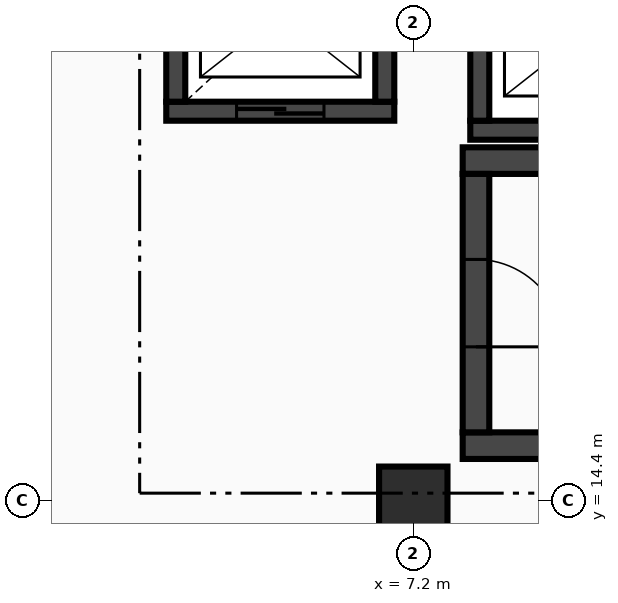
"""IFC4 building model, lengths in metres.
Left out: names, types, materials, properties, quantities, classifications, styles, units other than length and angle.
Written with IfcOpenShell. Run it as: python <this file> out.ifc"""

import sys

from ifc_helpers import new_model, si_unit, direction, frame, frame_2d, origin, origin_2d, place, context, subcontext, project, spatial, rectangle, extrude, element, fill, save


model = new_model("IFC4")
c1 = context("Model", 3, precision=1e-05, world=origin(), true_north=direction((0.0, 1.0)))
c2 = subcontext(c1, "Body", "Model", "MODEL_VIEW")
j1 = project(units=[si_unit("LENGTHUNIT", "METRE"), si_unit("PLANEANGLEUNIT", "RADIAN")], contexts=[c1])
p1 = place(None, origin())
s1 = spatial("IfcSite", under=j1, at=p1, CompositionType="ELEMENT")
p2 = place(p1, origin())
s2 = spatial("IfcBuilding", under=s1, at=p2, CompositionType="ELEMENT")
p3 = place(p2, frame((0.0, 0.0, 5.4)))
s3 = spatial("IfcBuildingStorey", under=s2, at=p3, CompositionType="ELEMENT", Elevation=5.4)
p4 = place(p3, frame((7.2, 14.4, 0.0), z_axis=(0.0, 0.0, 1.0), x_axis=(1.0, 0.0, 0.0)))
e1 = element("IfcColumn", 1, at=p4, inside=s3, PredefinedType="COLUMN", context=c2, shape_type="SweptSolid", body=[
    extrude(rectangle(XDim=0.9, YDim=0.9, at=origin_2d()), origin(), (0.0, 0.0, 1.0), 4.8),
])
for number, where, z_axis, x_axis in (
    (2, (7.85, 15.125, 0.0), (0.0, 0.0, 1.0), (1.0, 0.0, 0.0)),
    (3, (17.15, 18.875, 0.0), (0.0, 0.0, 1.0), (-1.0, 0.0, 0.0)),
):
    element("IfcWall", number, at=place(p3, frame(where, z_axis=z_axis, x_axis=x_axis)), inside=s3, PredefinedType="SHEAR", context=c2, shape_type="SweptSolid", body=[
        extrude(rectangle(XDim=9.3, YDim=0.35, at=frame_2d((4.65, 0.0))), origin(), (0.0, 0.0, 1.0), 4.52),
    ])
p5 = place(p3, frame((8.025, 18.7, 0.0), z_axis=(0.0, 0.0, 1.0), x_axis=(0.0, -1.0, 0.0)))
e4 = element("IfcWall", 4, at=p5, inside=s3, PredefinedType="SHEAR", context=c2, shape_type="SweptSolid", body=[
    extrude(rectangle(XDim=3.4, YDim=0.35, at=frame_2d((1.7, 0.0))), origin(), (0.0, 0.0, 1.0), 4.52),
])
p6 = place(p5, frame((1.125, 0.0, 0.0)))
e5 = element("IfcOpeningElement", 5, at=p6, cuts=e4, PredefinedType="OPENING", context=c2, shape_type="SweptSolid", body=[
    extrude(rectangle(XDim=1.15, YDim=2.1, at=frame_2d((0.575, 1.05))), frame((0.0, 0.185, 0.0), z_axis=(0.0, -1.0, 0.0), x_axis=(1.0, 0.0, 0.0)), (0.0, 0.0, 1.0), 0.37),
])
p7 = place(p3, frame((3.95, 19.525, 0.0), z_axis=(0.0, 0.0, 1.0), x_axis=(1.0, 0.0, 0.0)))
e6 = element("IfcWall", 6, at=p7, inside=s3, PredefinedType="SHEAR", context=c2, shape_type="SweptSolid", body=[
    extrude(rectangle(XDim=3.0, YDim=0.25, at=frame_2d((1.5, 0.0))), origin(), (0.0, 0.0, 1.0), 4.52),
])
p8 = place(p7, frame((0.925, 0.0, 0.0)))
e7 = element("IfcOpeningElement", 7, at=p8, cuts=e6, PredefinedType="OPENING", context=c2, shape_type="SweptSolid", body=[
    extrude(rectangle(XDim=1.15, YDim=2.1, at=frame_2d((0.575, 1.05))), frame((0.0, 0.135, 0.0), z_axis=(0.0, -1.0, 0.0), x_axis=(1.0, 0.0, 0.0)), (0.0, 0.0, 1.0), 0.27),
])
for number, where, z_axis, x_axis in (
    (8, (4.075, 21.95, 0.0), (0.0, 0.0, 1.0), (0.0, -1.0, 0.0)),
    (9, (6.825, 19.65, 0.0), (0.0, 0.0, 1.0), (0.0, 1.0, 0.0)),
):
    element("IfcWall", number, at=place(p3, frame(where, z_axis=z_axis, x_axis=x_axis)), inside=s3, PredefinedType="SHEAR", context=c2, shape_type="SweptSolid", body=[
        extrude(rectangle(XDim=2.3, YDim=0.25, at=frame_2d((1.15, 0.0))), origin(), (0.0, 0.0, 1.0), 4.52),
    ])
p9 = place(p3, frame((7.95, 19.275, 0.0), z_axis=(0.0, 0.0, 1.0), x_axis=(1.0, 0.0, 0.0)))
e10 = element("IfcWall", 10, at=p9, inside=s3, PredefinedType="SHEAR", context=c2, shape_type="SweptSolid", body=[
    extrude(rectangle(XDim=3.0, YDim=0.25, at=frame_2d((1.5, 0.0))), origin(), (0.0, 0.0, 1.0), 4.52),
])
p10 = place(p3, frame((8.075, 21.7, 0.0), z_axis=(0.0, 0.0, 1.0), x_axis=(0.0, -1.0, 0.0)))
e11 = element("IfcWall", 11, at=p10, inside=s3, PredefinedType="SHEAR", context=c2, shape_type="SweptSolid", body=[
    extrude(rectangle(XDim=2.3, YDim=0.25, at=frame_2d((1.15, 0.0))), origin(), (0.0, 0.0, 1.0), 4.52),
])
p11 = place(p6, frame((1.15, 0.0, 0.0), z_axis=(0.0, 0.0, 1.0), x_axis=(-1.0, 0.0, 0.0)))
e12 = element("IfcDoor", 12, at=p11, inside=s3, OperationType="SINGLE_SWING_LEFT", PredefinedType="DOOR", context=c2, shape_type="SweptSolid", body=[
    extrude(rectangle(XDim=1.15, YDim=2.1, at=frame_2d((0.575, 1.05))), frame((0.0, 0.025, 0.0), z_axis=(0.0, -1.0, 0.0), x_axis=(1.0, 0.0, 0.0)), (0.0, 0.0, 1.0), 0.05),
])
fill(e5, e12)
p12 = place(p8, origin())
e13 = element("IfcDoor", 13, at=p12, inside=s3, OperationType="SLIDING_TO_RIGHT", PredefinedType="DOOR", context=c2, shape_type="SweptSolid", body=[
    extrude(rectangle(XDim=1.15, YDim=2.1, at=frame_2d((0.575, 1.05))), frame((0.0, 0.025, 0.0), z_axis=(0.0, -1.0, 0.0), x_axis=(1.0, 0.0, 0.0)), (0.0, 0.0, 1.0), 0.05),
])
fill(e7, e13)
save(model, sys.argv[1])
